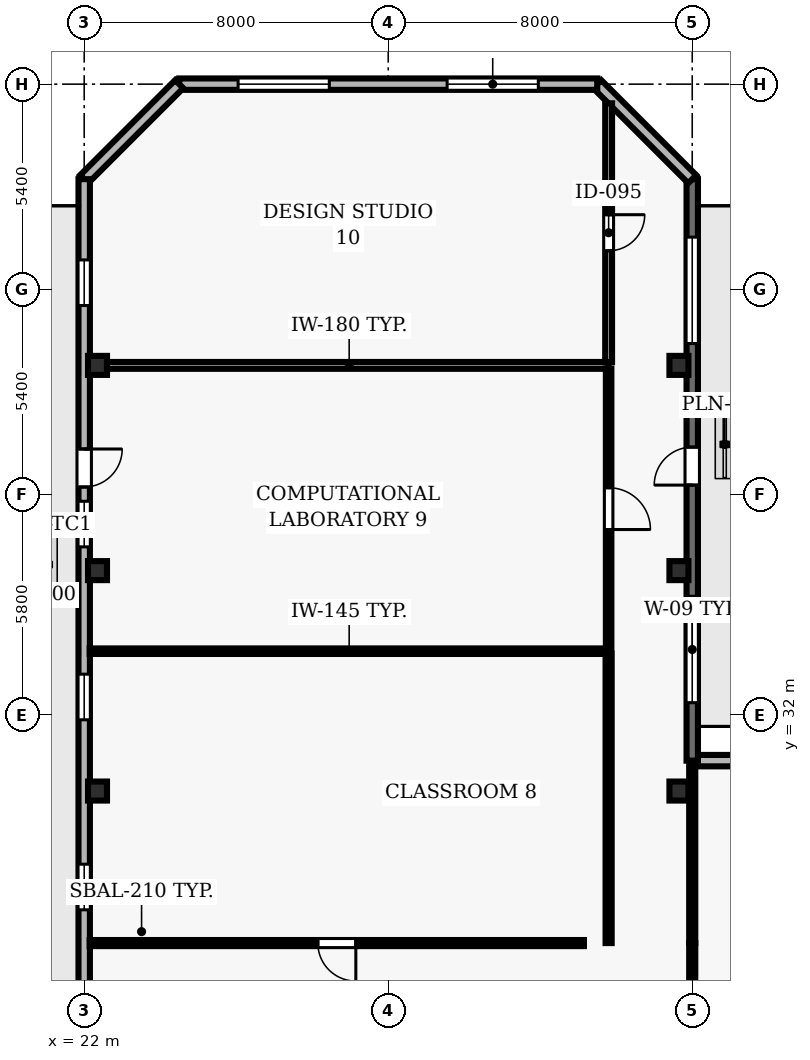
"""IFC4 building model, lengths in metres.
Left out: names, types, materials, properties, quantities, classifications, styles, units other than length and angle.
Written with IfcOpenShell. Run it as: python <this file> out.ifc"""

import sys

from ifc_helpers import new_model, si_unit, direction, frame, frame_2d, origin, origin_2d, place, context, subcontext, project, spatial, rectangle, hollow_rectangle, extrude, element, fill, save


model = new_model("IFC4")
c1 = context("Model", 3, precision=1e-05, world=origin(), true_north=direction((0.0, 1.0)))
c2 = subcontext(c1, "Body", "Model", "MODEL_VIEW")
j1 = project(units=[si_unit("LENGTHUNIT", "METRE"), si_unit("PLANEANGLEUNIT", "RADIAN")], contexts=[c1])
p1 = place(None, origin())
s1 = spatial("IfcSite", under=j1, at=p1, CompositionType="ELEMENT")
p2 = place(p1, origin())
s2 = spatial("IfcBuilding", under=s1, at=p2, CompositionType="ELEMENT")
p3 = place(p2, frame((0.0, 0.0, 103.4)))
s3 = spatial("IfcBuildingStorey", under=s2, at=p3, CompositionType="ELEMENT", Elevation=103.4)
for number, where, z_axis, x_axis in (
    (1, (22.35, 30.0, 0.0), (0.0, 0.0, 1.0), (1.0, 0.0, 0.0)),
    (2, (37.65, 30.0, 0.0), (0.0, 0.0, 1.0), (1.0, 0.0, 0.0)),
    (3, (22.35, 35.8, 0.0), (0.0, 0.0, 1.0), (1.0, 0.0, 0.0)),
    (4, (37.65, 35.8, 0.0), (0.0, 0.0, 1.0), (1.0, 0.0, 0.0)),
    (5, (22.35, 41.2, 0.0), (0.0, 0.0, 1.0), (1.0, 0.0, 0.0)),
    (6, (37.65, 41.2, 0.0), (0.0, 0.0, 1.0), (1.0, 0.0, 0.0)),
):
    element("IfcColumn", number, at=place(p3, frame(where, z_axis=z_axis, x_axis=x_axis)), inside=s3, PredefinedType="COLUMN", context=c2, shape_type="SweptSolid", body=[
        extrude(hollow_rectangle(XDim=0.5, YDim=0.5, WallThickness=0.025, at=origin_2d()), origin(), (0.0, 0.0, 1.0), 3.9),
    ])
p4 = place(p3, frame((47.456, 30.8, 0.0), z_axis=(0.0, 0.0, 1.0), x_axis=(-1.0, 0.0, 0.0)))
e7 = element("IfcWall", 7, at=p4, inside=s3, PredefinedType="SOLIDWALL", context=c2, shape_type="SweptSolid", body=[
    extrude(rectangle(XDim=9.456, YDim=0.3, at=frame_2d((4.728, 0.0))), origin(), (0.0, 0.0, 1.0), 3.69),
])
p5 = place(p4, frame((3.528, 0.0, 0.9)))
e8 = element("IfcOpeningElement", 8, at=p5, cuts=e7, PredefinedType="OPENING", context=c2, shape_type="SweptSolid", body=[
    extrude(rectangle(XDim=2.4, YDim=1.8, at=frame_2d((1.2, 0.9))), frame((0.0, 0.16, 0.0), z_axis=(0.0, -1.0, 0.0), x_axis=(1.0, 0.0, 0.0)), (0.0, 0.0, 1.0), 0.32),
])
p6 = place(p3, frame((38.0, 30.8, 0.0), z_axis=(0.0, 0.0, 1.0), x_axis=(0.0, 1.0, 0.0)))
e9 = element("IfcWall", 9, at=p6, inside=s3, PredefinedType="SOLIDWALL", context=c2, shape_type="SweptSolid", body=[
    extrude(rectangle(XDim=15.3, YDim=0.3, at=frame_2d((7.65, 0.0))), origin(), (0.0, 0.0, 1.0), 3.69),
])
p7 = place(p6, frame((7.25, 0.0, 0.0)))
e10 = element("IfcOpeningElement", 10, at=p7, cuts=e9, PredefinedType="OPENING", context=c2, shape_type="SweptSolid", body=[
    extrude(rectangle(XDim=1.0, YDim=2.2, at=frame_2d((0.5, 1.1))), frame((0.0, 0.16, 0.0), z_axis=(0.0, -1.0, 0.0), x_axis=(1.0, 0.0, 0.0)), (0.0, 0.0, 1.0), 0.32),
])
p8 = place(p6, frame((1.525, 0.0, 0.9)))
e11 = element("IfcOpeningElement", 11, at=p8, cuts=e9, PredefinedType="OPENING", context=c2, shape_type="SweptSolid", body=[
    extrude(rectangle(XDim=2.8, YDim=1.8, at=frame_2d((1.4, 0.9))), frame((0.0, 0.16, 0.0), z_axis=(0.0, -1.0, 0.0), x_axis=(1.0, 0.0, 0.0)), (0.0, 0.0, 1.0), 0.32),
])
p9 = place(p6, frame((10.975, 0.0, 0.9)))
e12 = element("IfcOpeningElement", 12, at=p9, cuts=e9, PredefinedType="OPENING", context=c2, shape_type="SweptSolid", body=[
    extrude(rectangle(XDim=2.8, YDim=1.8, at=frame_2d((1.4, 0.9))), frame((0.0, 0.16, 0.0), z_axis=(0.0, -1.0, 0.0), x_axis=(1.0, 0.0, 0.0)), (0.0, 0.0, 1.0), 0.32),
])
p10 = place(p3, frame((38.0, 46.1, 0.0), z_axis=(0.0, 0.0, 1.0), x_axis=(-0.707106781187, 0.707106781187, 0.0)))
e13 = element("IfcWall", 13, at=p10, inside=s3, PredefinedType="SOLIDWALL", context=c2, shape_type="SweptSolid", body=[
    extrude(rectangle(XDim=3.536, YDim=0.3, at=frame_2d((1.768, 0.0))), origin(), (0.0, 0.0, 1.0), 3.69),
])
p11 = place(p3, frame((35.5, 48.6, 0.0), z_axis=(0.0, 0.0, 1.0), x_axis=(-1.0, 0.0, 0.0)))
e14 = element("IfcWall", 14, at=p11, inside=s3, PredefinedType="SOLIDWALL", context=c2, shape_type="SweptSolid", body=[
    extrude(rectangle(XDim=11.0, YDim=0.3, at=frame_2d((5.5, 0.0))), origin(), (0.0, 0.0, 1.0), 3.69),
])
p12 = place(p11, frame((1.55, 0.0, 0.9)))
e15 = element("IfcOpeningElement", 15, at=p12, cuts=e14, PredefinedType="OPENING", context=c2, shape_type="SweptSolid", body=[
    extrude(rectangle(XDim=2.4, YDim=2.2, at=frame_2d((1.2, 1.1))), frame((0.0, 0.16, 0.0), z_axis=(0.0, -1.0, 0.0), x_axis=(1.0, 0.0, 0.0)), (0.0, 0.0, 1.0), 0.32),
])
p13 = place(p11, frame((7.05, 0.0, 0.9)))
e16 = element("IfcOpeningElement", 16, at=p13, cuts=e14, PredefinedType="OPENING", context=c2, shape_type="SweptSolid", body=[
    extrude(rectangle(XDim=2.4, YDim=2.2, at=frame_2d((1.2, 1.1))), frame((0.0, 0.16, 0.0), z_axis=(0.0, -1.0, 0.0), x_axis=(1.0, 0.0, 0.0)), (0.0, 0.0, 1.0), 0.32),
])
p14 = place(p3, frame((24.5, 48.6, 0.0), z_axis=(0.0, 0.0, 1.0), x_axis=(-0.707106781187, -0.707106781187, 0.0)))
e17 = element("IfcWall", 17, at=p14, inside=s3, PredefinedType="SOLIDWALL", context=c2, shape_type="SweptSolid", body=[
    extrude(rectangle(XDim=3.536, YDim=0.3, at=frame_2d((1.768, 0.0))), origin(), (0.0, 0.0, 1.0), 3.69),
])
p15 = place(p3, frame((22.0, 46.1, 0.0), z_axis=(0.0, 0.0, 1.0), x_axis=(0.0, -1.0, 0.0)))
e18 = element("IfcWall", 18, at=p15, inside=s3, PredefinedType="SOLIDWALL", context=c2, shape_type="SweptSolid", body=[
    extrude(rectangle(XDim=43.6, YDim=0.3, at=frame_2d((21.8, 0.0))), origin(), (0.0, 0.0, 1.0), 3.69),
])
p16 = place(p15, frame((7.1, 0.0, 0.0)))
e19 = element("IfcOpeningElement", 19, at=p16, cuts=e18, PredefinedType="OPENING", context=c2, shape_type="SweptSolid", body=[
    extrude(rectangle(XDim=1.0, YDim=2.2, at=frame_2d((0.5, 1.1))), frame((0.0, 0.16, 0.0), z_axis=(0.0, -1.0, 0.0), x_axis=(1.0, 0.0, 0.0)), (0.0, 0.0, 1.0), 0.32),
])
p17 = place(p15, frame((2.125, 0.0, 0.9)))
e20 = element("IfcOpeningElement", 20, at=p17, cuts=e18, PredefinedType="OPENING", context=c2, shape_type="SweptSolid", body=[
    extrude(rectangle(XDim=1.2, YDim=1.6, at=frame_2d((0.6, 0.8))), frame((0.0, 0.16, 0.0), z_axis=(0.0, -1.0, 0.0), x_axis=(1.0, 0.0, 0.0)), (0.0, 0.0, 1.0), 0.32),
])
p18 = place(p15, frame((8.475, 0.0, 0.9)))
e21 = element("IfcOpeningElement", 21, at=p18, cuts=e18, PredefinedType="OPENING", context=c2, shape_type="SweptSolid", body=[
    extrude(rectangle(XDim=1.2, YDim=1.6, at=frame_2d((0.6, 0.8))), frame((0.0, 0.16, 0.0), z_axis=(0.0, -1.0, 0.0), x_axis=(1.0, 0.0, 0.0)), (0.0, 0.0, 1.0), 0.32),
])
p19 = place(p15, frame((13.025, 0.0, 0.9)))
e22 = element("IfcOpeningElement", 22, at=p19, cuts=e18, PredefinedType="OPENING", context=c2, shape_type="SweptSolid", body=[
    extrude(rectangle(XDim=1.2, YDim=1.6, at=frame_2d((0.6, 0.8))), frame((0.0, 0.16, 0.0), z_axis=(0.0, -1.0, 0.0), x_axis=(1.0, 0.0, 0.0)), (0.0, 0.0, 1.0), 0.32),
])
p20 = place(p15, frame((18.025, 0.0, 0.9)))
e23 = element("IfcOpeningElement", 23, at=p20, cuts=e18, PredefinedType="OPENING", context=c2, shape_type="SweptSolid", body=[
    extrude(rectangle(XDim=1.2, YDim=1.6, at=frame_2d((0.6, 0.8))), frame((0.0, 0.16, 0.0), z_axis=(0.0, -1.0, 0.0), x_axis=(1.0, 0.0, 0.0)), (0.0, 0.0, 1.0), 0.32),
])
p21 = place(p15, frame((23.925, 0.0, 0.9)))
e24 = element("IfcOpeningElement", 24, at=p21, cuts=e18, PredefinedType="OPENING", context=c2, shape_type="SweptSolid", body=[
    extrude(rectangle(XDim=1.2, YDim=1.6, at=frame_2d((0.6, 0.8))), frame((0.0, 0.16, 0.0), z_axis=(0.0, -1.0, 0.0), x_axis=(1.0, 0.0, 0.0)), (0.0, 0.0, 1.0), 0.32),
])
p22 = place(p15, frame((29.375, 0.0, 0.9)))
e25 = element("IfcOpeningElement", 25, at=p22, cuts=e18, PredefinedType="OPENING", context=c2, shape_type="SweptSolid", body=[
    extrude(rectangle(XDim=1.2, YDim=1.6, at=frame_2d((0.6, 0.8))), frame((0.0, 0.16, 0.0), z_axis=(0.0, -1.0, 0.0), x_axis=(1.0, 0.0, 0.0)), (0.0, 0.0, 1.0), 0.32),
])
p23 = place(p15, frame((34.825, 0.0, 0.9)))
e26 = element("IfcOpeningElement", 26, at=p23, cuts=e18, PredefinedType="OPENING", context=c2, shape_type="SweptSolid", body=[
    extrude(rectangle(XDim=1.2, YDim=1.6, at=frame_2d((0.6, 0.8))), frame((0.0, 0.16, 0.0), z_axis=(0.0, -1.0, 0.0), x_axis=(1.0, 0.0, 0.0)), (0.0, 0.0, 1.0), 0.32),
])
p24 = place(p3, frame((35.15, 26.0, 0.0), z_axis=(0.0, 0.0, 1.0), x_axis=(-1.0, 0.0, 0.0)))
e27 = element("IfcWall", 27, at=p24, inside=s3, PredefinedType="PARTITIONING", context=c2, shape_type="SweptSolid", body=[
    extrude(rectangle(XDim=13.005, YDim=0.16, at=frame_2d((6.502, 0.0))), origin(), (0.0, 0.0, 1.0), 3.69),
])
p25 = place(p24, frame((6.002, 0.0, 0.0)))
e28 = element("IfcOpeningElement", 28, at=p25, cuts=e27, PredefinedType="OPENING", context=c2, shape_type="SweptSolid", body=[
    extrude(rectangle(XDim=1.0, YDim=2.1, at=frame_2d((0.5, 1.05))), frame((0.0, 0.09, 0.0), z_axis=(0.0, -1.0, 0.0), x_axis=(1.0, 0.0, 0.0)), (0.0, 0.0, 1.0), 0.18),
])
p26 = place(p3, frame((35.8, 33.68, 0.0), z_axis=(0.0, 0.0, 1.0), x_axis=(-1.0, 0.0, 0.0)))
e29 = element("IfcWall", 29, at=p26, inside=s3, PredefinedType="PARTITIONING", context=c2, shape_type="SweptSolid", body=[
    extrude(rectangle(XDim=13.655, YDim=0.145, at=frame_2d((6.828, 0.0))), origin(), (0.0, 0.0, 1.0), 3.69),
])
p27 = place(p3, frame((35.8, 41.2, 0.0), z_axis=(0.0, 0.0, 1.0), x_axis=(-1.0, 0.0, 0.0)))
e30 = element("IfcWall", 30, at=p27, inside=s3, PredefinedType="PARTITIONING", context=c2, shape_type="SweptSolid", body=[
    extrude(rectangle(XDim=13.655, YDim=0.18, at=frame_2d((6.828, 0.0))), origin(), (0.0, 0.0, 1.0), 3.074),
])
p28 = place(p3, frame((35.8, 33.612, 0.0), z_axis=(0.0, 0.0, 1.0), x_axis=(0.0, -1.0, 0.0)))
e31 = element("IfcWall", 31, at=p28, inside=s3, PredefinedType="PARTITIONING", context=c2, shape_type="SweptSolid", body=[
    extrude(rectangle(XDim=7.612, YDim=0.16, at=frame_2d((3.806, 0.0))), origin(), (0.0, 0.0, 1.0), 3.69),
])
p29 = place(p3, frame((35.8, 41.115, 0.0), z_axis=(0.0, 0.0, 1.0), x_axis=(0.0, -1.0, 0.0)))
e32 = element("IfcWall", 32, at=p29, inside=s3, PredefinedType="PARTITIONING", context=c2, shape_type="SweptSolid", body=[
    extrude(rectangle(XDim=7.367, YDim=0.145, at=frame_2d((3.684, 0.0))), origin(), (0.0, 0.0, 1.0), 3.69),
])
p30 = place(p29, frame((3.134, 0.0, 0.0)))
e33 = element("IfcOpeningElement", 33, at=p30, cuts=e32, PredefinedType="OPENING", context=c2, shape_type="SweptSolid", body=[
    extrude(rectangle(XDim=1.1, YDim=2.15, at=frame_2d((0.55, 1.075))), frame((0.0, 0.083, 0.0), z_axis=(0.0, -1.0, 0.0), x_axis=(1.0, 0.0, 0.0)), (0.0, 0.0, 1.0), 0.165),
])
p31 = place(p3, frame((35.8, 48.095, 0.0), z_axis=(0.0, 0.0, 1.0), x_axis=(0.0, -1.0, 0.0)))
e34 = element("IfcWall", 34, at=p31, inside=s3, PredefinedType="PARTITIONING", context=c2, shape_type="SweptSolid", body=[
    extrude(rectangle(XDim=6.81, YDim=0.18, at=frame_2d((3.405, 0.0))), origin(), (0.0, 0.0, 1.0), 3.69),
])
p32 = place(p31, frame((2.93, 0.0, 0.0)))
e35 = element("IfcOpeningElement", 35, at=p32, cuts=e34, PredefinedType="OPENING", context=c2, shape_type="SweptSolid", body=[
    extrude(rectangle(XDim=0.95, YDim=2.1, at=frame_2d((0.475, 1.05))), frame((0.0, 0.1, 0.0), z_axis=(0.0, -1.0, 0.0), x_axis=(1.0, 0.0, 0.0)), (0.0, 0.0, 1.0), 0.2),
])
p33 = place(p3, frame((38.0, 24.05, 0.0), z_axis=(0.0, 0.0, 1.0), x_axis=(0.0, 1.0, 0.0)))
e36 = element("IfcWall", 36, at=p33, inside=s3, PredefinedType="PARTITIONING", context=c2, shape_type="SweptSolid", body=[
    extrude(rectangle(XDim=1.95, YDim=0.16, at=frame_2d((0.975, 0.0))), origin(), (0.0, 0.0, 1.0), 3.074),
])
p34 = place(p3, frame((38.0, 26.0, 0.0), z_axis=(0.0, 0.0, 1.0), x_axis=(0.0, 1.0, 0.0)))
e37 = element("IfcWall", 37, at=p34, inside=s3, PredefinedType="PARTITIONING", context=c2, shape_type="SweptSolid", body=[
    extrude(rectangle(XDim=4.655, YDim=0.16, at=frame_2d((2.328, 0.0))), origin(), (0.0, 0.0, 1.0), 3.074),
])
p35 = place(p7, origin())
e38 = element("IfcDoor", 38, at=p35, inside=s3, OperationType="SINGLE_SWING_LEFT", PredefinedType="DOOR", context=c2, shape_type="SweptSolid", body=[
    extrude(rectangle(XDim=1.0, YDim=2.2, at=frame_2d((0.5, 1.1))), frame((0.0, 0.025, 0.0), z_axis=(0.0, -1.0, 0.0), x_axis=(1.0, 0.0, 0.0)), (0.0, 0.0, 1.0), 0.05),
])
fill(e10, e38)
p36 = place(p8, origin())
e39 = element("IfcWindow", 39, at=p36, inside=s3, PartitioningType="SINGLE_PANEL", PredefinedType="WINDOW", context=c2, shape_type="SweptSolid", body=[
    extrude(rectangle(XDim=2.8, YDim=1.8, at=frame_2d((1.4, 0.9))), frame((0.0, 0.03, 0.0), z_axis=(0.0, -1.0, 0.0), x_axis=(1.0, 0.0, 0.0)), (0.0, 0.0, 1.0), 0.06),
])
fill(e11, e39)
p37 = place(p9, origin())
e40 = element("IfcWindow", 40, at=p37, inside=s3, PartitioningType="SINGLE_PANEL", PredefinedType="WINDOW", context=c2, shape_type="SweptSolid", body=[
    extrude(rectangle(XDim=2.8, YDim=1.8, at=frame_2d((1.4, 0.9))), frame((0.0, 0.03, 0.0), z_axis=(0.0, -1.0, 0.0), x_axis=(1.0, 0.0, 0.0)), (0.0, 0.0, 1.0), 0.06),
])
fill(e12, e40)
p38 = place(p12, origin())
e41 = element("IfcWindow", 41, at=p38, inside=s3, PartitioningType="SINGLE_PANEL", PredefinedType="WINDOW", context=c2, shape_type="SweptSolid", body=[
    extrude(rectangle(XDim=2.4, YDim=2.2, at=frame_2d((1.2, 1.1))), frame((0.0, 0.03, 0.0), z_axis=(0.0, -1.0, 0.0), x_axis=(1.0, 0.0, 0.0)), (0.0, 0.0, 1.0), 0.06),
])
fill(e15, e41)
p39 = place(p13, origin())
e42 = element("IfcWindow", 42, at=p39, inside=s3, PartitioningType="SINGLE_PANEL", PredefinedType="WINDOW", context=c2, shape_type="SweptSolid", body=[
    extrude(rectangle(XDim=2.4, YDim=2.2, at=frame_2d((1.2, 1.1))), frame((0.0, 0.03, 0.0), z_axis=(0.0, -1.0, 0.0), x_axis=(1.0, 0.0, 0.0)), (0.0, 0.0, 1.0), 0.06),
])
fill(e16, e42)
p40 = place(p16, origin())
e43 = element("IfcDoor", 43, at=p40, inside=s3, OperationType="SINGLE_SWING_LEFT", PredefinedType="DOOR", context=c2, shape_type="SweptSolid", body=[
    extrude(rectangle(XDim=1.0, YDim=2.2, at=frame_2d((0.5, 1.1))), frame((0.0, 0.025, 0.0), z_axis=(0.0, -1.0, 0.0), x_axis=(1.0, 0.0, 0.0)), (0.0, 0.0, 1.0), 0.05),
])
fill(e19, e43)
p41 = place(p17, origin())
e44 = element("IfcWindow", 44, at=p41, inside=s3, PartitioningType="SINGLE_PANEL", PredefinedType="WINDOW", context=c2, shape_type="SweptSolid", body=[
    extrude(rectangle(XDim=1.2, YDim=1.6, at=frame_2d((0.6, 0.8))), frame((0.0, 0.03, 0.0), z_axis=(0.0, -1.0, 0.0), x_axis=(1.0, 0.0, 0.0)), (0.0, 0.0, 1.0), 0.06),
])
fill(e20, e44)
p42 = place(p18, origin())
e45 = element("IfcWindow", 45, at=p42, inside=s3, PartitioningType="SINGLE_PANEL", PredefinedType="WINDOW", context=c2, shape_type="SweptSolid", body=[
    extrude(rectangle(XDim=1.2, YDim=1.6, at=frame_2d((0.6, 0.8))), frame((0.0, 0.03, 0.0), z_axis=(0.0, -1.0, 0.0), x_axis=(1.0, 0.0, 0.0)), (0.0, 0.0, 1.0), 0.06),
])
fill(e21, e45)
p43 = place(p19, origin())
e46 = element("IfcWindow", 46, at=p43, inside=s3, PartitioningType="SINGLE_PANEL", PredefinedType="WINDOW", context=c2, shape_type="SweptSolid", body=[
    extrude(rectangle(XDim=1.2, YDim=1.6, at=frame_2d((0.6, 0.8))), frame((0.0, 0.03, 0.0), z_axis=(0.0, -1.0, 0.0), x_axis=(1.0, 0.0, 0.0)), (0.0, 0.0, 1.0), 0.06),
])
fill(e22, e46)
p44 = place(p20, origin())
e47 = element("IfcWindow", 47, at=p44, inside=s3, PartitioningType="SINGLE_PANEL", PredefinedType="WINDOW", context=c2, shape_type="SweptSolid", body=[
    extrude(rectangle(XDim=1.2, YDim=1.6, at=frame_2d((0.6, 0.8))), frame((0.0, 0.03, 0.0), z_axis=(0.0, -1.0, 0.0), x_axis=(1.0, 0.0, 0.0)), (0.0, 0.0, 1.0), 0.06),
])
fill(e23, e47)
p45 = place(p25, origin())
e48 = element("IfcDoor", 48, at=p45, inside=s3, OperationType="SINGLE_SWING_LEFT", PredefinedType="DOOR", context=c2, shape_type="SweptSolid", body=[
    extrude(rectangle(XDim=1.0, YDim=2.1, at=frame_2d((0.5, 1.05))), frame((0.0, 0.025, 0.0), z_axis=(0.0, -1.0, 0.0), x_axis=(1.0, 0.0, 0.0)), (0.0, 0.0, 1.0), 0.05),
])
fill(e28, e48)
p46 = place(p30, origin())
e49 = element("IfcDoor", 49, at=p46, inside=s3, OperationType="SINGLE_SWING_RIGHT", PredefinedType="DOOR", context=c2, shape_type="SweptSolid", body=[
    extrude(rectangle(XDim=1.1, YDim=2.15, at=frame_2d((0.55, 1.075))), frame((0.0, 0.025, 0.0), z_axis=(0.0, -1.0, 0.0), x_axis=(1.0, 0.0, 0.0)), (0.0, 0.0, 1.0), 0.05),
])
fill(e33, e49)
p47 = place(p32, origin())
e50 = element("IfcDoor", 50, at=p47, inside=s3, OperationType="SINGLE_SWING_LEFT", PredefinedType="DOOR", context=c2, shape_type="SweptSolid", body=[
    extrude(rectangle(XDim=0.95, YDim=2.1, at=frame_2d((0.475, 1.05))), frame((0.0, 0.025, 0.0), z_axis=(0.0, -1.0, 0.0), x_axis=(1.0, 0.0, 0.0)), (0.0, 0.0, 1.0), 0.05),
])
fill(e35, e50)
save(model, sys.argv[1])
